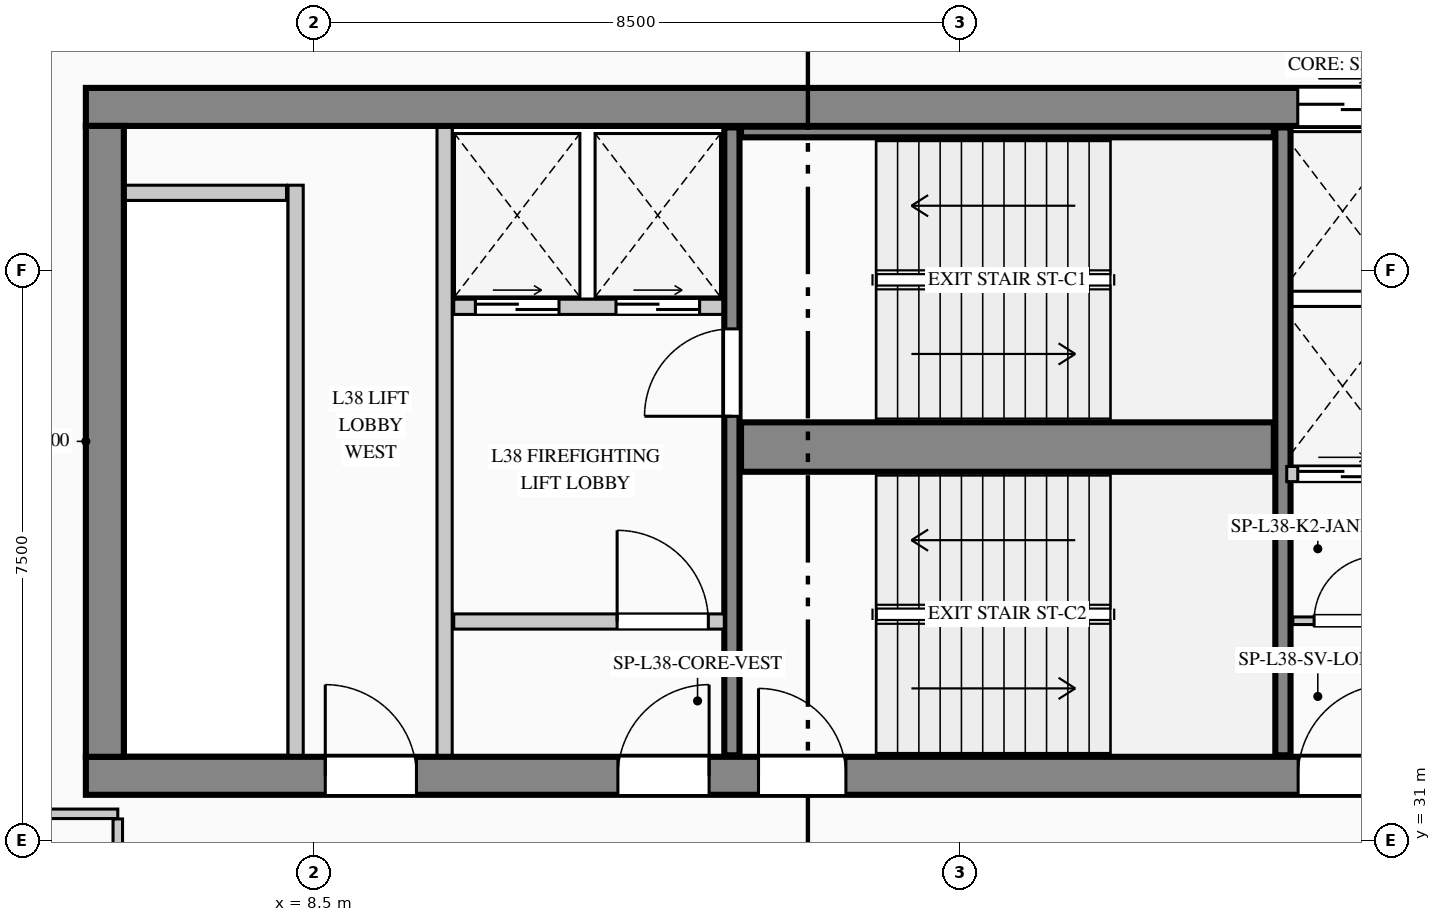
"""IFC4 building model, lengths in metres.
Left out: names, types, materials, properties, quantities, classifications, styles, units other than length and angle.
Written with IfcOpenShell. Run it as: python <this file> out.ifc"""

import sys

from ifc_helpers import new_model, si_unit, direction, frame, frame_2d, origin, place, context, subcontext, project, spatial, rectangle, extrude, element, fill, save


model = new_model("IFC4")
c1 = context("Model", 3, precision=1e-05, world=origin(), true_north=direction((0.0, 1.0)))
c2 = subcontext(c1, "Body", "Model", "MODEL_VIEW")
j1 = project(units=[si_unit("LENGTHUNIT", "METRE"), si_unit("PLANEANGLEUNIT", "RADIAN")], contexts=[c1])
p1 = place(None, origin())
s1 = spatial("IfcSite", under=j1, at=p1, CompositionType="ELEMENT")
p2 = place(p1, origin())
s2 = spatial("IfcBuilding", under=s1, at=p2, CompositionType="ELEMENT")
p3 = place(p2, frame((0.0, 0.0, 162.75)))
s3 = spatial("IfcBuildingStorey", under=s2, at=p3, CompositionType="ELEMENT", Elevation=162.75)
p4 = place(p3, frame((5.5, 40.65, 0.0), z_axis=(0.0, 0.0, 1.0), x_axis=(1.0, 0.0, 0.0)))
e1 = element("IfcWall", 1, at=p4, inside=s3, PredefinedType="SHEAR", context=c2, shape_type="SweptSolid", body=[
    extrude(rectangle(XDim=17.85, YDim=0.5, at=frame_2d((8.925, 0.0))), origin(), (0.0, 0.0, 1.0), 3.95),
])
p5 = place(p4, frame((15.945, 0.0, 0.0)))
e2 = element("IfcOpeningElement", 2, at=p5, cuts=e1, PredefinedType="OPENING", context=c2, shape_type="SweptSolid", body=[
    extrude(rectangle(XDim=1.18, YDim=2.25, at=frame_2d((0.59, 1.125))), frame((0.0, 0.26, 0.0), z_axis=(0.0, -1.0, 0.0), x_axis=(1.0, 0.0, 0.0)), (0.0, 0.0, 1.0), 0.52),
])
p6 = place(p3, frame((5.5, 31.85, 0.0), z_axis=(0.0, 0.0, 1.0), x_axis=(1.0, 0.0, 0.0)))
e3 = element("IfcWall", 3, at=p6, inside=s3, PredefinedType="SHEAR", context=c2, shape_type="SweptSolid", body=[
    extrude(rectangle(XDim=17.85, YDim=0.5, at=frame_2d((8.925, 0.0))), origin(), (0.0, 0.0, 1.0), 3.95),
])
p7 = place(p6, frame((3.15, 0.0, 0.0)))
e4 = element("IfcOpeningElement", 4, at=p7, cuts=e3, PredefinedType="OPENING", context=c2, shape_type="SweptSolid", body=[
    extrude(rectangle(XDim=1.2, YDim=2.2, at=frame_2d((0.6, 1.1))), frame((0.0, 0.26, 0.0), z_axis=(0.0, -1.0, 0.0), x_axis=(1.0, 0.0, 0.0)), (0.0, 0.0, 1.0), 0.52),
])
p8 = place(p6, frame((7.0, 0.0, 0.0)))
e5 = element("IfcOpeningElement", 5, at=p8, cuts=e3, PredefinedType="OPENING", context=c2, shape_type="SweptSolid", body=[
    extrude(rectangle(XDim=1.2, YDim=2.2, at=frame_2d((0.6, 1.1))), frame((0.0, 0.26, 0.0), z_axis=(0.0, -1.0, 0.0), x_axis=(1.0, 0.0, 0.0)), (0.0, 0.0, 1.0), 0.52),
])
p9 = place(p6, frame((8.85, 0.0, 0.0)))
e6 = element("IfcOpeningElement", 6, at=p9, cuts=e3, PredefinedType="OPENING", context=c2, shape_type="SweptSolid", body=[
    extrude(rectangle(XDim=1.15, YDim=2.2, at=frame_2d((0.575, 1.1))), frame((0.0, 0.26, 0.0), z_axis=(0.0, -1.0, 0.0), x_axis=(1.0, 0.0, 0.0)), (0.0, 0.0, 1.0), 0.52),
])
p10 = place(p6, frame((15.95, 0.0, 0.0)))
e7 = element("IfcOpeningElement", 7, at=p10, cuts=e3, PredefinedType="OPENING", context=c2, shape_type="SweptSolid", body=[
    extrude(rectangle(XDim=1.2, YDim=2.2, at=frame_2d((0.6, 1.1))), frame((0.0, 0.26, 0.0), z_axis=(0.0, -1.0, 0.0), x_axis=(1.0, 0.0, 0.0)), (0.0, 0.0, 1.0), 0.52),
])
p11 = place(p3, frame((5.75, 32.1, 0.0), z_axis=(0.0, 0.0, 1.0), x_axis=(0.0, 1.0, 0.0)))
e8 = element("IfcWall", 8, at=p11, inside=s3, PredefinedType="SHEAR", context=c2, shape_type="SweptSolid", body=[
    extrude(rectangle(XDim=8.3, YDim=0.5, at=frame_2d((4.15, 0.0))), origin(), (0.0, 0.0, 1.0), 3.95),
])
p12 = place(p3, frame((14.0, 32.12, 0.0), z_axis=(0.0, 0.0, 1.0), x_axis=(0.0, 1.0, 0.0)))
e9 = element("IfcWall", 9, at=p12, inside=s3, PredefinedType="SHEAR", context=c2, shape_type="SweptSolid", body=[
    extrude(rectangle(XDim=8.26, YDim=0.2, at=frame_2d((4.13, 0.0))), origin(), (0.0, 0.0, 1.0), 3.95),
])
p13 = place(p12, frame((4.46, 0.0, 0.0)))
e10 = element("IfcOpeningElement", 10, at=p13, cuts=e9, PredefinedType="OPENING", context=c2, shape_type="SweptSolid", body=[
    extrude(rectangle(XDim=1.15, YDim=2.2, at=frame_2d((0.575, 1.1))), frame((0.0, 0.11, 0.0), z_axis=(0.0, -1.0, 0.0), x_axis=(1.0, 0.0, 0.0)), (0.0, 0.0, 1.0), 0.22),
])
p14 = place(p3, frame((14.12, 36.175, 0.0), z_axis=(0.0, 0.0, 1.0), x_axis=(1.0, 0.0, 0.0)))
e11 = element("IfcWall", 11, at=p14, inside=s3, PredefinedType="SHEAR", context=c2, shape_type="SweptSolid", body=[
    extrude(rectangle(XDim=7.01, YDim=0.65, at=frame_2d((3.505, 0.0))), origin(), (0.0, 0.0, 1.0), 3.95),
])
p15 = place(p3, frame((21.25, 32.12, 0.0), z_axis=(0.0, 0.0, 1.0), x_axis=(0.0, 1.0, 0.0)))
e12 = element("IfcWall", 12, at=p15, inside=s3, PredefinedType="SHEAR", context=c2, shape_type="SweptSolid", body=[
    extrude(rectangle(XDim=8.26, YDim=0.2, at=frame_2d((4.13, 0.0))), origin(), (0.0, 0.0, 1.0), 3.95),
])
p16 = place(p3, frame((14.12, 40.32, 0.0), z_axis=(0.0, 0.0, 1.0), x_axis=(1.0, 0.0, 0.0)))
e13 = element("IfcWall", 13, at=p16, inside=s3, PredefinedType="SHEAR", context=c2, shape_type="SweptSolid", body=[
    extrude(rectangle(XDim=7.01, YDim=0.14, at=frame_2d((3.505, 0.0))), origin(), (0.0, 0.0, 1.0), 3.95),
])
p17 = place(p3, frame((7.993, 4.73, 0.0), z_axis=(0.0, 0.0, 1.0), x_axis=(-0.136989009016, 0.990572567462, 0.0)))
e14 = element("IfcWall", 14, at=p17, inside=s3, PredefinedType="STANDARD", context=c2, shape_type="SweptSolid", body=[
    extrude(rectangle(XDim=36.888, YDim=0.26, at=frame_2d((18.444, 0.0))), origin(), (0.0, 0.0, 1.0), 3.69),
])
p18 = place(p17, frame((20.748, 0.0, 0.9)))
e15 = element("IfcOpeningElement", 15, at=p18, cuts=e14, PredefinedType="OPENING", context=c2, shape_type="SweptSolid", body=[
    extrude(rectangle(XDim=2.1, YDim=2.0, at=frame_2d((1.05, 1.0))), frame((0.0, 0.14, 0.0), z_axis=(0.0, -1.0, 0.0), x_axis=(1.0, 0.0, 0.0)), (0.0, 0.0, 1.0), 0.28),
])
p19 = place(p3, frame((8.26, 32.12, 0.0), z_axis=(0.0, 0.0, 1.0), x_axis=(0.0, 1.0, 0.0)))
e16 = element("IfcWall", 16, at=p19, inside=s3, PredefinedType="PARTITIONING", context=c2, shape_type="SweptSolid", body=[
    extrude(rectangle(XDim=7.5, YDim=0.2, at=frame_2d((3.75, 0.0))), origin(), (0.0, 0.0, 1.0), 3.69),
])
p20 = place(p3, frame((6.02, 39.52, 0.0), z_axis=(0.0, 0.0, 1.0), x_axis=(1.0, 0.0, 0.0)))
e17 = element("IfcWall", 17, at=p20, inside=s3, PredefinedType="PARTITIONING", context=c2, shape_type="SweptSolid", body=[
    extrude(rectangle(XDim=2.12, YDim=0.2, at=frame_2d((1.06, 0.0))), origin(), (0.0, 0.0, 1.0), 3.69),
])
p21 = place(p3, frame((10.22, 32.12, 0.0), z_axis=(0.0, 0.0, 1.0), x_axis=(0.0, 1.0, 0.0)))
e18 = element("IfcWall", 18, at=p21, inside=s3, PredefinedType="PARTITIONING", context=c2, shape_type="SweptSolid", body=[
    extrude(rectangle(XDim=8.26, YDim=0.2, at=frame_2d((4.13, 0.0))), origin(), (0.0, 0.0, 1.0), 3.69),
])
p22 = place(p3, frame((10.34, 38.02, 0.0), z_axis=(0.0, 0.0, 1.0), x_axis=(1.0, 0.0, 0.0)))
e19 = element("IfcWall", 19, at=p22, inside=s3, PredefinedType="PARTITIONING", context=c2, shape_type="SweptSolid", body=[
    extrude(rectangle(XDim=3.54, YDim=0.2, at=frame_2d((1.77, 0.0))), origin(), (0.0, 0.0, 1.0), 3.69),
])
p23 = place(p22, frame((0.285, 0.0, 0.0)))
e20 = element("IfcOpeningElement", 20, at=p23, cuts=e19, PredefinedType="OPENING", context=c2, shape_type="SweptSolid", body=[
    extrude(rectangle(XDim=1.1, YDim=2.2, at=frame_2d((0.55, 1.1))), frame((0.0, 0.11, 0.0), z_axis=(0.0, -1.0, 0.0), x_axis=(1.0, 0.0, 0.0)), (0.0, 0.0, 1.0), 0.22),
])
p24 = place(p22, frame((2.135, 0.0, 0.0)))
e21 = element("IfcOpeningElement", 21, at=p24, cuts=e19, PredefinedType="OPENING", context=c2, shape_type="SweptSolid", body=[
    extrude(rectangle(XDim=1.1, YDim=2.2, at=frame_2d((0.55, 1.1))), frame((0.0, 0.11, 0.0), z_axis=(0.0, -1.0, 0.0), x_axis=(1.0, 0.0, 0.0)), (0.0, 0.0, 1.0), 0.22),
])
p25 = place(p3, frame((10.34, 33.88, 0.0), z_axis=(0.0, 0.0, 1.0), x_axis=(1.0, 0.0, 0.0)))
e22 = element("IfcWall", 22, at=p25, inside=s3, PredefinedType="PARTITIONING", context=c2, shape_type="SweptSolid", body=[
    extrude(rectangle(XDim=3.56, YDim=0.2, at=frame_2d((1.78, 0.0))), origin(), (0.0, 0.0, 1.0), 3.69),
])
p26 = place(p25, frame((2.15, 0.0, 0.0)))
e23 = element("IfcOpeningElement", 23, at=p26, cuts=e22, PredefinedType="OPENING", context=c2, shape_type="SweptSolid", body=[
    extrude(rectangle(XDim=1.2, YDim=2.2, at=frame_2d((0.6, 1.1))), frame((0.0, 0.11, 0.0), z_axis=(0.0, -1.0, 0.0), x_axis=(1.0, 0.0, 0.0)), (0.0, 0.0, 1.0), 0.22),
])
p27 = place(p3, frame((21.38, 33.89, 0.0), z_axis=(0.0, 0.0, 1.0), x_axis=(1.0, 0.0, 0.0)))
e24 = element("IfcWall", 24, at=p27, inside=s3, PredefinedType="PARTITIONING", context=c2, shape_type="SweptSolid", body=[
    extrude(rectangle(XDim=1.42, YDim=0.1, at=frame_2d((0.71, 0.0))), origin(), (0.0, 0.0, 1.0), 3.69),
])
p28 = place(p27, frame((0.28, 0.0, 0.0)))
e25 = element("IfcOpeningElement", 25, at=p28, cuts=e24, PredefinedType="OPENING", context=c2, shape_type="SweptSolid", body=[
    extrude(rectangle(XDim=0.85, YDim=2.1, at=frame_2d((0.425, 1.05))), frame((0.0, 0.06, 0.0), z_axis=(0.0, -1.0, 0.0), x_axis=(1.0, 0.0, 0.0)), (0.0, 0.0, 1.0), 0.12),
])
p29 = place(p3, frame((21.3, 35.82, 0.0), z_axis=(0.0, 0.0, 1.0), x_axis=(1.0, 0.0, 0.0)))
e26 = element("IfcWall", 26, at=p29, inside=s3, PredefinedType="PARTITIONING", context=c2, shape_type="SweptSolid", body=[
    extrude(rectangle(XDim=1.5, YDim=0.2, at=frame_2d((0.75, 0.0))), origin(), (0.0, 0.0, 1.0), 3.69),
])
p30 = place(p29, frame((0.145, 0.0, 0.0)))
e27 = element("IfcOpeningElement", 27, at=p30, cuts=e26, PredefinedType="OPENING", context=c2, shape_type="SweptSolid", body=[
    extrude(rectangle(XDim=1.18, YDim=2.25, at=frame_2d((0.59, 1.125))), frame((0.0, 0.11, 0.0), z_axis=(0.0, -1.0, 0.0), x_axis=(1.0, 0.0, 0.0)), (0.0, 0.0, 1.0), 0.22),
])
p31 = place(p3, frame((4.448, 31.35, 0.0), z_axis=(0.0, 0.0, 1.0), x_axis=(1.0, 0.0, 0.0)))
e28 = element("IfcWall", 28, at=p31, inside=s3, PredefinedType="PARTITIONING", context=c2, shape_type="SweptSolid", body=[
    extrude(rectangle(XDim=1.472, YDim=0.125, at=frame_2d((0.736, 0.0))), origin(), (0.0, 0.0, 1.0), 3.69),
])
p32 = place(p3, frame((5.92, 31.282, 0.0), z_axis=(0.0, 0.0, 1.0), x_axis=(0.0, -1.0, 0.0)))
e29 = element("IfcWall", 29, at=p32, inside=s3, PredefinedType="PARTITIONING", context=c2, shape_type="SweptSolid", body=[
    extrude(rectangle(XDim=2.682, YDim=0.125, at=frame_2d((1.341, 0.0))), origin(), (0.0, 0.0, 1.0), 3.69),
])
p33 = place(p7, origin())
e30 = element("IfcDoor", 30, at=p33, inside=s3, OperationType="SINGLE_SWING_LEFT", PredefinedType="DOOR", context=c2, shape_type="SweptSolid", body=[
    extrude(rectangle(XDim=1.2, YDim=2.2, at=frame_2d((0.6, 1.1))), frame((0.0, 0.025, 0.0), z_axis=(0.0, -1.0, 0.0), x_axis=(1.0, 0.0, 0.0)), (0.0, 0.0, 1.0), 0.05),
])
fill(e4, e30)
p34 = place(p8, origin())
e31 = element("IfcDoor", 31, at=p34, inside=s3, OperationType="SINGLE_SWING_RIGHT", PredefinedType="DOOR", context=c2, shape_type="SweptSolid", body=[
    extrude(rectangle(XDim=1.2, YDim=2.2, at=frame_2d((0.6, 1.1))), frame((0.0, 0.025, 0.0), z_axis=(0.0, -1.0, 0.0), x_axis=(1.0, 0.0, 0.0)), (0.0, 0.0, 1.0), 0.05),
])
fill(e5, e31)
p35 = place(p9, origin())
e32 = element("IfcDoor", 32, at=p35, inside=s3, OperationType="SINGLE_SWING_LEFT", PredefinedType="DOOR", context=c2, shape_type="SweptSolid", body=[
    extrude(rectangle(XDim=1.15, YDim=2.2, at=frame_2d((0.575, 1.1))), frame((0.0, 0.025, 0.0), z_axis=(0.0, -1.0, 0.0), x_axis=(1.0, 0.0, 0.0)), (0.0, 0.0, 1.0), 0.05),
])
fill(e6, e32)
p36 = place(p10, origin())
e33 = element("IfcDoor", 33, at=p36, inside=s3, OperationType="SINGLE_SWING_RIGHT", PredefinedType="DOOR", context=c2, shape_type="SweptSolid", body=[
    extrude(rectangle(XDim=1.2, YDim=2.2, at=frame_2d((0.6, 1.1))), frame((0.0, 0.025, 0.0), z_axis=(0.0, -1.0, 0.0), x_axis=(1.0, 0.0, 0.0)), (0.0, 0.0, 1.0), 0.05),
])
fill(e7, e33)
p37 = place(p26, origin())
e34 = element("IfcDoor", 34, at=p37, inside=s3, OperationType="SINGLE_SWING_LEFT", PredefinedType="DOOR", context=c2, shape_type="SweptSolid", body=[
    extrude(rectangle(XDim=1.2, YDim=2.2, at=frame_2d((0.6, 1.1))), frame((0.0, 0.025, 0.0), z_axis=(0.0, -1.0, 0.0), x_axis=(1.0, 0.0, 0.0)), (0.0, 0.0, 1.0), 0.05),
])
fill(e23, e34)
p38 = place(p28, origin())
e35 = element("IfcDoor", 35, at=p38, inside=s3, OperationType="SINGLE_SWING_RIGHT", PredefinedType="DOOR", context=c2, shape_type="SweptSolid", body=[
    extrude(rectangle(XDim=0.85, YDim=2.1, at=frame_2d((0.425, 1.05))), frame((0.0, 0.025, 0.0), z_axis=(0.0, -1.0, 0.0), x_axis=(1.0, 0.0, 0.0)), (0.0, 0.0, 1.0), 0.05),
])
fill(e25, e35)
p39 = place(p13, origin())
e36 = element("IfcDoor", 36, at=p39, inside=s3, OperationType="SINGLE_SWING_LEFT", PredefinedType="DOOR", context=c2, shape_type="SweptSolid", body=[
    extrude(rectangle(XDim=1.15, YDim=2.2, at=frame_2d((0.575, 1.1))), frame((0.0, 0.025, 0.0), z_axis=(0.0, -1.0, 0.0), x_axis=(1.0, 0.0, 0.0)), (0.0, 0.0, 1.0), 0.05),
])
fill(e10, e36)
p40 = place(p23, origin())
e37 = element("IfcDoor", 37, at=p40, inside=s3, OperationType="DOUBLE_DOOR_SLIDING", PredefinedType="DOOR", context=c2, shape_type="SweptSolid", body=[
    extrude(rectangle(XDim=1.1, YDim=2.2, at=frame_2d((0.55, 1.1))), frame((0.0, 0.025, 0.0), z_axis=(0.0, -1.0, 0.0), x_axis=(1.0, 0.0, 0.0)), (0.0, 0.0, 1.0), 0.05),
])
fill(e20, e37)
p41 = place(p24, origin())
e38 = element("IfcDoor", 38, at=p41, inside=s3, OperationType="DOUBLE_DOOR_SLIDING", PredefinedType="DOOR", context=c2, shape_type="SweptSolid", body=[
    extrude(rectangle(XDim=1.1, YDim=2.2, at=frame_2d((0.55, 1.1))), frame((0.0, 0.025, 0.0), z_axis=(0.0, -1.0, 0.0), x_axis=(1.0, 0.0, 0.0)), (0.0, 0.0, 1.0), 0.05),
])
fill(e21, e38)
p42 = place(p5, origin())
e39 = element("IfcDoor", 39, at=p42, inside=s3, OperationType="DOUBLE_DOOR_SLIDING", PredefinedType="DOOR", context=c2, shape_type="SweptSolid", body=[
    extrude(rectangle(XDim=1.18, YDim=2.25, at=frame_2d((0.59, 1.125))), frame((0.0, 0.025, 0.0), z_axis=(0.0, -1.0, 0.0), x_axis=(1.0, 0.0, 0.0)), (0.0, 0.0, 1.0), 0.05),
])
fill(e2, e39)
p43 = place(p30, origin())
e40 = element("IfcDoor", 40, at=p43, inside=s3, OperationType="DOUBLE_DOOR_SLIDING", PredefinedType="DOOR", context=c2, shape_type="SweptSolid", body=[
    extrude(rectangle(XDim=1.18, YDim=2.25, at=frame_2d((0.59, 1.125))), frame((0.0, 0.025, 0.0), z_axis=(0.0, -1.0, 0.0), x_axis=(1.0, 0.0, 0.0)), (0.0, 0.0, 1.0), 0.05),
])
fill(e27, e40)
save(model, sys.argv[1])
